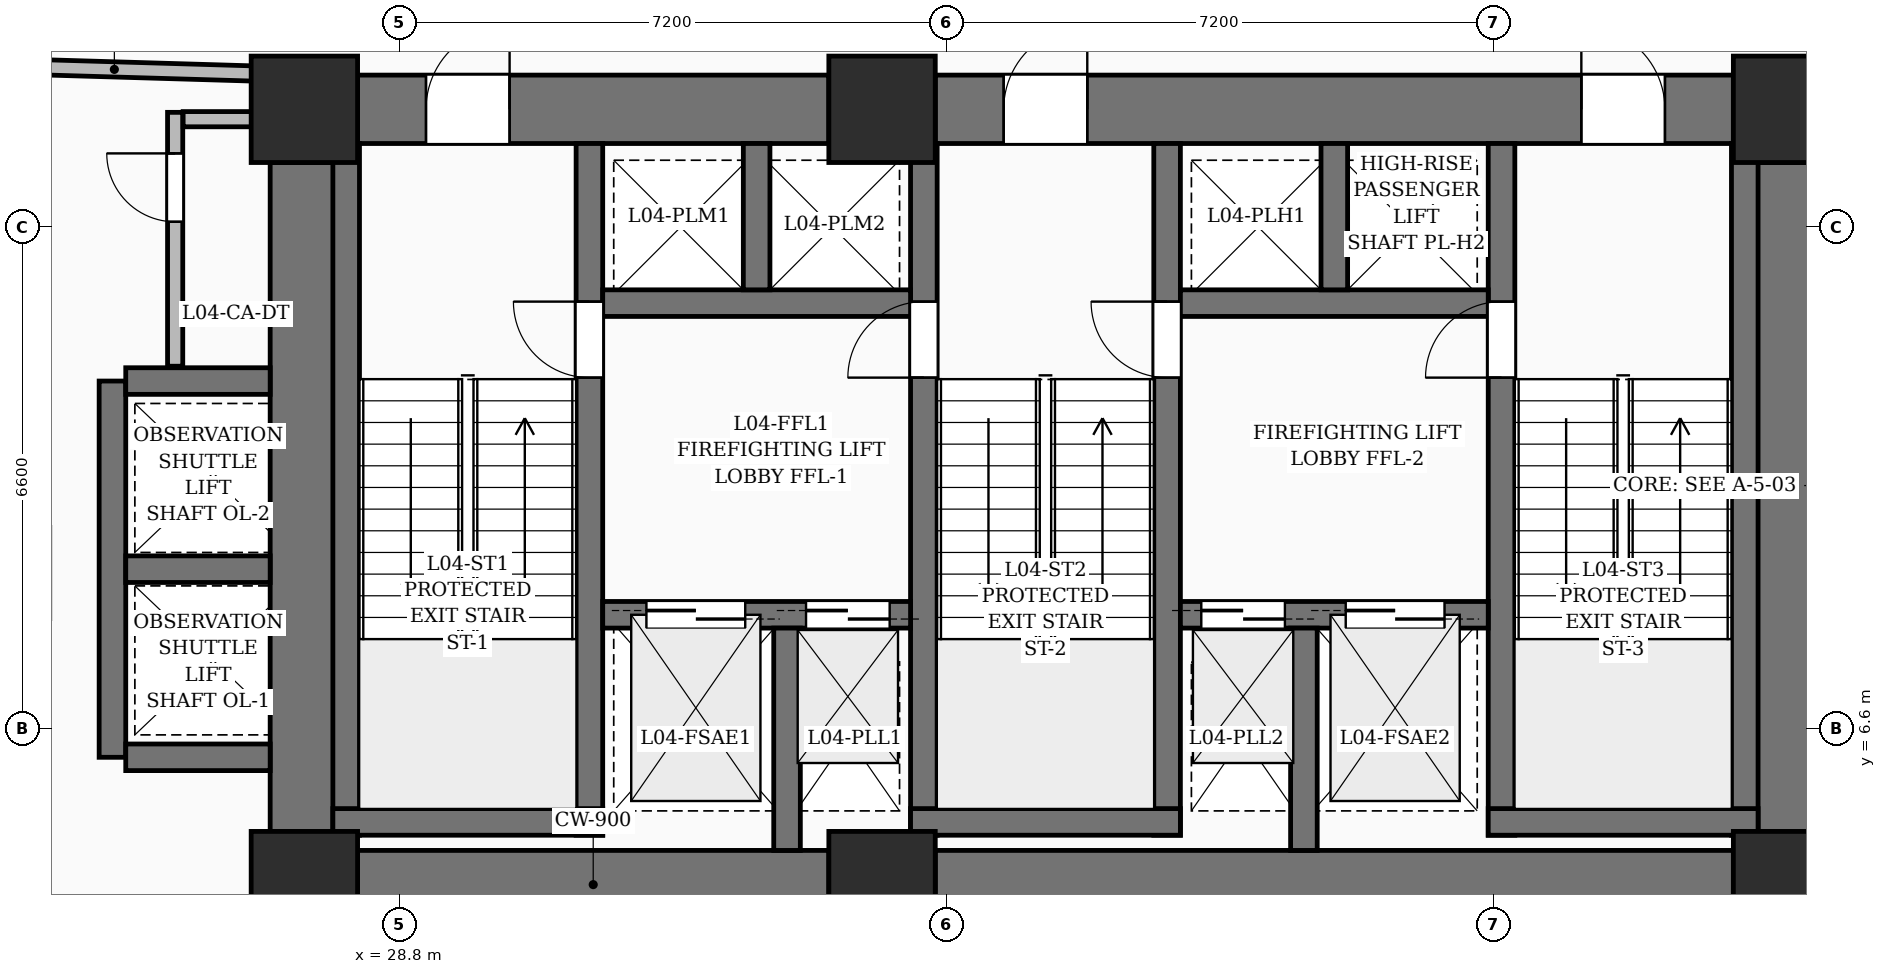
"""IFC4 building model, lengths in metres.
Left out: names, types, materials, properties, quantities, classifications, styles, units other than length and angle.
Written with IfcOpenShell. Run it as: python <this file> out.ifc"""

import sys

from ifc_helpers import new_model, si_unit, direction, frame, frame_2d, origin, origin_2d, place, context, subcontext, project, spatial, rectangle, extrude, element, fill, save


model = new_model("IFC4")
c1 = context("Model", 3, precision=1e-05, world=origin(), true_north=direction((0.0, 1.0)))
c2 = subcontext(c1, "Body", "Model", "MODEL_VIEW")
j1 = project(units=[si_unit("LENGTHUNIT", "METRE"), si_unit("PLANEANGLEUNIT", "RADIAN")], contexts=[c1])
p1 = place(None, origin())
s1 = spatial("IfcSite", under=j1, at=p1, CompositionType="ELEMENT")
p2 = place(p1, origin())
s2 = spatial("IfcBuilding", under=s1, at=p2, CompositionType="ELEMENT")
p3 = place(p2, frame((0.0, 0.0, 21.9)))
s3 = spatial("IfcBuildingStorey", under=s2, at=p3, CompositionType="ELEMENT", Elevation=21.9)
for number, where, z_axis, x_axis in (
    (1, (27.55, 4.55, 0.0), (0.0, 0.0, 1.0), (1.0, 0.0, 0.0)),
    (2, (35.15, 4.55, 0.0), (0.0, 0.0, 1.0), (1.0, 0.0, 0.0)),
    (3, (47.05, 4.55, 0.0), (0.0, 0.0, 1.0), (1.0, 0.0, 0.0)),
    (4, (27.55, 14.75, 0.0), (0.0, 0.0, 1.0), (1.0, 0.0, 0.0)),
    (5, (35.15, 14.75, 0.0), (0.0, 0.0, 1.0), (1.0, 0.0, 0.0)),
    (6, (47.05, 14.75, 0.0), (0.0, 0.0, 1.0), (1.0, 0.0, 0.0)),
):
    element("IfcColumn", number, at=place(p3, frame(where, z_axis=z_axis, x_axis=x_axis)), inside=s3, PredefinedType="COLUMN", context=c2, shape_type="SweptSolid", body=[
        extrude(rectangle(XDim=1.4, YDim=1.4, at=origin_2d()), origin(), (0.0, 0.0, 1.0), 4.5),
    ])
p4 = place(p3, frame((28.25, 4.55, 0.0), z_axis=(0.0, 0.0, 1.0), x_axis=(1.0, 0.0, 0.0)))
e7 = element("IfcWall", 7, at=p4, inside=s3, PredefinedType="SHEAR", context=c2, shape_type="SweptSolid", body=[
    extrude(rectangle(XDim=6.2, YDim=0.9, at=frame_2d((3.1, 0.0))), origin(), (0.0, 0.0, 1.0), 4.5),
])
p5 = place(p3, frame((35.85, 4.55, 0.0), z_axis=(0.0, 0.0, 1.0), x_axis=(1.0, 0.0, 0.0)))
e8 = element("IfcWall", 8, at=p5, inside=s3, PredefinedType="SHEAR", context=c2, shape_type="SweptSolid", body=[
    extrude(rectangle(XDim=10.5, YDim=0.9, at=frame_2d((5.25, 0.0))), origin(), (0.0, 0.0, 1.0), 4.5),
])
p6 = place(p3, frame((28.25, 14.75, 0.0), z_axis=(0.0, 0.0, 1.0), x_axis=(1.0, 0.0, 0.0)))
e9 = element("IfcWall", 9, at=p6, inside=s3, PredefinedType="SHEAR", context=c2, shape_type="SweptSolid", body=[
    extrude(rectangle(XDim=6.2, YDim=0.9, at=frame_2d((3.1, 0.0))), origin(), (0.0, 0.0, 1.0), 4.5),
])
p7 = place(p6, frame((0.9, 0.0, 0.0)))
e10 = element("IfcOpeningElement", 10, at=p7, cuts=e9, PredefinedType="OPENING", context=c2, shape_type="SweptSolid", body=[
    extrude(rectangle(XDim=1.1, YDim=2.2, at=frame_2d((0.55, 1.1))), frame((0.0, 0.46, 0.0), z_axis=(0.0, -1.0, 0.0), x_axis=(1.0, 0.0, 0.0)), (0.0, 0.0, 1.0), 0.92),
])
p8 = place(p3, frame((35.85, 14.75, 0.0), z_axis=(0.0, 0.0, 1.0), x_axis=(1.0, 0.0, 0.0)))
e11 = element("IfcWall", 11, at=p8, inside=s3, PredefinedType="SHEAR", context=c2, shape_type="SweptSolid", body=[
    extrude(rectangle(XDim=10.5, YDim=0.9, at=frame_2d((5.25, 0.0))), origin(), (0.0, 0.0, 1.0), 4.5),
])
p9 = place(p8, frame((0.9, 0.0, 0.0)))
e12 = element("IfcOpeningElement", 12, at=p9, cuts=e11, PredefinedType="OPENING", context=c2, shape_type="SweptSolid", body=[
    extrude(rectangle(XDim=1.1, YDim=2.2, at=frame_2d((0.55, 1.1))), frame((0.0, 0.46, 0.0), z_axis=(0.0, -1.0, 0.0), x_axis=(1.0, 0.0, 0.0)), (0.0, 0.0, 1.0), 0.92),
])
p10 = place(p8, frame((8.5, 0.0, 0.0)))
e13 = element("IfcOpeningElement", 13, at=p10, cuts=e11, PredefinedType="OPENING", context=c2, shape_type="SweptSolid", body=[
    extrude(rectangle(XDim=1.1, YDim=2.2, at=frame_2d((0.55, 1.1))), frame((0.0, 0.46, 0.0), z_axis=(0.0, -1.0, 0.0), x_axis=(1.0, 0.0, 0.0)), (0.0, 0.0, 1.0), 0.92),
])
for number, where, z_axis, x_axis in (
    (14, (27.55, 5.25, 0.0), (0.0, 0.0, 1.0), (0.0, 1.0, 0.0)),
    (15, (47.05, 5.25, 0.0), (0.0, 0.0, 1.0), (0.0, 1.0, 0.0)),
):
    element("IfcWall", number, at=place(p3, frame(where, z_axis=z_axis, x_axis=x_axis)), inside=s3, PredefinedType="SHEAR", context=c2, shape_type="SweptSolid", body=[
        extrude(rectangle(XDim=8.8, YDim=0.9, at=frame_2d((4.4, 0.0))), origin(), (0.0, 0.0, 1.0), 4.5),
    ])
p11 = place(p3, frame((28.1, 5.2, 0.0), z_axis=(0.0, 0.0, 1.0), x_axis=(0.0, 1.0, 0.0)))
e16 = element("IfcWall", 16, at=p11, inside=s3, PredefinedType="SOLIDWALL", context=c2, shape_type="SweptSolid", body=[
    extrude(rectangle(XDim=9.1, YDim=0.35, at=frame_2d((4.55, 0.0))), origin(), (0.0, 0.0, 1.0), 4.5),
])
p12 = place(p3, frame((31.3, 5.2, 0.0), z_axis=(0.0, 0.0, 1.0), x_axis=(0.0, 1.0, 0.0)))
e17 = element("IfcWall", 17, at=p12, inside=s3, PredefinedType="SOLIDWALL", context=c2, shape_type="SweptSolid", body=[
    extrude(rectangle(XDim=9.1, YDim=0.35, at=frame_2d((4.55, 0.0))), origin(), (0.0, 0.0, 1.0), 4.5),
])
p13 = place(p12, frame((6.02, 0.0, 0.0)))
e18 = element("IfcOpeningElement", 18, at=p13, cuts=e17, PredefinedType="OPENING", context=c2, shape_type="SweptSolid", body=[
    extrude(rectangle(XDim=1.0, YDim=2.15, at=frame_2d((0.5, 1.075))), frame((0.0, 0.185, 0.0), z_axis=(0.0, -1.0, 0.0), x_axis=(1.0, 0.0, 0.0)), (0.0, 0.0, 1.0), 0.37),
])
p14 = place(p3, frame((27.925, 5.375, 0.0), z_axis=(0.0, 0.0, 1.0), x_axis=(1.0, 0.0, 0.0)))
e19 = element("IfcWall", 19, at=p14, inside=s3, PredefinedType="SOLIDWALL", context=c2, shape_type="SweptSolid", body=[
    extrude(rectangle(XDim=3.55, YDim=0.35, at=frame_2d((1.775, 0.0))), origin(), (0.0, 0.0, 1.0), 4.5),
])
p15 = place(p3, frame((35.7, 5.2, 0.0), z_axis=(0.0, 0.0, 1.0), x_axis=(0.0, 1.0, 0.0)))
e20 = element("IfcWall", 20, at=p15, inside=s3, PredefinedType="SOLIDWALL", context=c2, shape_type="SweptSolid", body=[
    extrude(rectangle(XDim=9.1, YDim=0.35, at=frame_2d((4.55, 0.0))), origin(), (0.0, 0.0, 1.0), 4.5),
])
p16 = place(p15, frame((6.02, 0.0, 0.0)))
e21 = element("IfcOpeningElement", 21, at=p16, cuts=e20, PredefinedType="OPENING", context=c2, shape_type="SweptSolid", body=[
    extrude(rectangle(XDim=1.0, YDim=2.15, at=frame_2d((0.5, 1.075))), frame((0.0, 0.185, 0.0), z_axis=(0.0, -1.0, 0.0), x_axis=(1.0, 0.0, 0.0)), (0.0, 0.0, 1.0), 0.37),
])
p17 = place(p3, frame((38.9, 5.2, 0.0), z_axis=(0.0, 0.0, 1.0), x_axis=(0.0, 1.0, 0.0)))
e22 = element("IfcWall", 22, at=p17, inside=s3, PredefinedType="SOLIDWALL", context=c2, shape_type="SweptSolid", body=[
    extrude(rectangle(XDim=9.1, YDim=0.35, at=frame_2d((4.55, 0.0))), origin(), (0.0, 0.0, 1.0), 4.5),
])
p18 = place(p17, frame((6.02, 0.0, 0.0)))
e23 = element("IfcOpeningElement", 23, at=p18, cuts=e22, PredefinedType="OPENING", context=c2, shape_type="SweptSolid", body=[
    extrude(rectangle(XDim=1.0, YDim=2.15, at=frame_2d((0.5, 1.075))), frame((0.0, 0.185, 0.0), z_axis=(0.0, -1.0, 0.0), x_axis=(1.0, 0.0, 0.0)), (0.0, 0.0, 1.0), 0.37),
])
p19 = place(p3, frame((35.525, 5.375, 0.0), z_axis=(0.0, 0.0, 1.0), x_axis=(1.0, 0.0, 0.0)))
e24 = element("IfcWall", 24, at=p19, inside=s3, PredefinedType="SOLIDWALL", context=c2, shape_type="SweptSolid", body=[
    extrude(rectangle(XDim=3.55, YDim=0.35, at=frame_2d((1.775, 0.0))), origin(), (0.0, 0.0, 1.0), 4.5),
])
p20 = place(p3, frame((43.3, 5.2, 0.0), z_axis=(0.0, 0.0, 1.0), x_axis=(0.0, 1.0, 0.0)))
e25 = element("IfcWall", 25, at=p20, inside=s3, PredefinedType="SOLIDWALL", context=c2, shape_type="SweptSolid", body=[
    extrude(rectangle(XDim=9.1, YDim=0.35, at=frame_2d((4.55, 0.0))), origin(), (0.0, 0.0, 1.0), 4.5),
])
p21 = place(p20, frame((6.02, 0.0, 0.0)))
e26 = element("IfcOpeningElement", 26, at=p21, cuts=e25, PredefinedType="OPENING", context=c2, shape_type="SweptSolid", body=[
    extrude(rectangle(XDim=1.0, YDim=2.15, at=frame_2d((0.5, 1.075))), frame((0.0, 0.185, 0.0), z_axis=(0.0, -1.0, 0.0), x_axis=(1.0, 0.0, 0.0)), (0.0, 0.0, 1.0), 0.37),
])
p22 = place(p3, frame((46.5, 5.2, 0.0), z_axis=(0.0, 0.0, 1.0), x_axis=(0.0, 1.0, 0.0)))
e27 = element("IfcWall", 27, at=p22, inside=s3, PredefinedType="SOLIDWALL", context=c2, shape_type="SweptSolid", body=[
    extrude(rectangle(XDim=9.1, YDim=0.35, at=frame_2d((4.55, 0.0))), origin(), (0.0, 0.0, 1.0), 4.5),
])
p23 = place(p3, frame((43.125, 5.375, 0.0), z_axis=(0.0, 0.0, 1.0), x_axis=(1.0, 0.0, 0.0)))
e28 = element("IfcWall", 28, at=p23, inside=s3, PredefinedType="SOLIDWALL", context=c2, shape_type="SweptSolid", body=[
    extrude(rectangle(XDim=3.55, YDim=0.35, at=frame_2d((1.775, 0.0))), origin(), (0.0, 0.0, 1.0), 4.5),
])
p24 = place(p3, frame((31.475, 8.1, 0.0), z_axis=(0.0, 0.0, 1.0), x_axis=(1.0, 0.0, 0.0)))
e29 = element("IfcWall", 29, at=p24, inside=s3, PredefinedType="SOLIDWALL", context=c2, shape_type="SweptSolid", body=[
    extrude(rectangle(XDim=4.05, YDim=0.35, at=frame_2d((2.025, 0.0))), origin(), (0.0, 0.0, 1.0), 4.5),
])
p25 = place(p24, frame((0.575, 0.0, 0.0)))
e30 = element("IfcOpeningElement", 30, at=p25, cuts=e29, PredefinedType="OPENING", context=c2, shape_type="SweptSolid", body=[
    extrude(rectangle(XDim=1.3, YDim=2.25, at=frame_2d((0.65, 1.125))), frame((0.0, 0.185, 0.0), z_axis=(0.0, -1.0, 0.0), x_axis=(1.0, 0.0, 0.0)), (0.0, 0.0, 1.0), 0.37),
])
p26 = place(p24, frame((2.675, 0.0, 0.0)))
e31 = element("IfcOpeningElement", 31, at=p26, cuts=e29, PredefinedType="OPENING", context=c2, shape_type="SweptSolid", body=[
    extrude(rectangle(XDim=1.1, YDim=2.2, at=frame_2d((0.55, 1.1))), frame((0.0, 0.185, 0.0), z_axis=(0.0, -1.0, 0.0), x_axis=(1.0, 0.0, 0.0)), (0.0, 0.0, 1.0), 0.37),
])
p27 = place(p3, frame((39.075, 8.1, 0.0), z_axis=(0.0, 0.0, 1.0), x_axis=(1.0, 0.0, 0.0)))
e32 = element("IfcWall", 32, at=p27, inside=s3, PredefinedType="SOLIDWALL", context=c2, shape_type="SweptSolid", body=[
    extrude(rectangle(XDim=4.05, YDim=0.35, at=frame_2d((2.025, 0.0))), origin(), (0.0, 0.0, 1.0), 4.5),
])
p28 = place(p27, frame((2.175, 0.0, 0.0)))
e33 = element("IfcOpeningElement", 33, at=p28, cuts=e32, PredefinedType="OPENING", context=c2, shape_type="SweptSolid", body=[
    extrude(rectangle(XDim=1.3, YDim=2.25, at=frame_2d((0.65, 1.125))), frame((0.0, 0.185, 0.0), z_axis=(0.0, -1.0, 0.0), x_axis=(1.0, 0.0, 0.0)), (0.0, 0.0, 1.0), 0.37),
])
p29 = place(p27, frame((0.275, 0.0, 0.0)))
e34 = element("IfcOpeningElement", 34, at=p29, cuts=e32, PredefinedType="OPENING", context=c2, shape_type="SweptSolid", body=[
    extrude(rectangle(XDim=1.1, YDim=2.2, at=frame_2d((0.55, 1.1))), frame((0.0, 0.185, 0.0), z_axis=(0.0, -1.0, 0.0), x_axis=(1.0, 0.0, 0.0)), (0.0, 0.0, 1.0), 0.37),
])
for number, where, z_axis, x_axis in (
    (35, (33.9, 5.0, 0.0), (0.0, 0.0, 1.0), (0.0, 1.0, 0.0)),
    (36, (40.7, 5.0, 0.0), (0.0, 0.0, 1.0), (0.0, 1.0, 0.0)),
):
    element("IfcWall", number, at=place(p3, frame(where, z_axis=z_axis, x_axis=x_axis)), inside=s3, PredefinedType="SOLIDWALL", context=c2, shape_type="SweptSolid", body=[
        extrude(rectangle(XDim=2.925, YDim=0.35, at=frame_2d((1.462, 0.0))), origin(), (0.0, 0.0, 1.0), 4.5),
    ])
p30 = place(p3, frame((31.475, 12.2, 0.0), z_axis=(0.0, 0.0, 1.0), x_axis=(1.0, 0.0, 0.0)))
e37 = element("IfcWall", 37, at=p30, inside=s3, PredefinedType="SOLIDWALL", context=c2, shape_type="SweptSolid", body=[
    extrude(rectangle(XDim=4.05, YDim=0.35, at=frame_2d((2.025, 0.0))), origin(), (0.0, 0.0, 1.0), 4.5),
])
p31 = place(p3, frame((33.5, 12.375, 0.0), z_axis=(0.0, 0.0, 1.0), x_axis=(0.0, 1.0, 0.0)))
e38 = element("IfcWall", 38, at=p31, inside=s3, PredefinedType="SOLIDWALL", context=c2, shape_type="SweptSolid", body=[
    extrude(rectangle(XDim=1.925, YDim=0.35, at=frame_2d((0.962, 0.0))), origin(), (0.0, 0.0, 1.0), 4.5),
])
p32 = place(p3, frame((39.075, 12.2, 0.0), z_axis=(0.0, 0.0, 1.0), x_axis=(1.0, 0.0, 0.0)))
e39 = element("IfcWall", 39, at=p32, inside=s3, PredefinedType="SOLIDWALL", context=c2, shape_type="SweptSolid", body=[
    extrude(rectangle(XDim=4.05, YDim=0.35, at=frame_2d((2.025, 0.0))), origin(), (0.0, 0.0, 1.0), 4.5),
])
p33 = place(p3, frame((41.1, 12.375, 0.0), z_axis=(0.0, 0.0, 1.0), x_axis=(0.0, 1.0, 0.0)))
e40 = element("IfcWall", 40, at=p33, inside=s3, PredefinedType="SOLIDWALL", context=c2, shape_type="SweptSolid", body=[
    extrude(rectangle(XDim=1.925, YDim=0.35, at=frame_2d((0.962, 0.0))), origin(), (0.0, 0.0, 1.0), 4.5),
])
p34 = place(p3, frame((25.025, 6.225, 0.0), z_axis=(0.0, 0.0, 1.0), x_axis=(0.0, 1.0, 0.0)))
e41 = element("IfcWall", 41, at=p34, inside=s3, PredefinedType="SOLIDWALL", context=c2, shape_type="SweptSolid", body=[
    extrude(rectangle(XDim=4.95, YDim=0.35, at=frame_2d((2.475, 0.0))), origin(), (0.0, 0.0, 1.0), 4.5),
])
for number, where, z_axis, x_axis in (
    (42, (25.2, 6.225, 0.0), (0.0, 0.0, 1.0), (1.0, 0.0, 0.0)),
    (43, (25.2, 8.7, 0.0), (0.0, 0.0, 1.0), (1.0, 0.0, 0.0)),
    (44, (25.2, 11.175, 0.0), (0.0, 0.0, 1.0), (1.0, 0.0, 0.0)),
):
    element("IfcWall", number, at=place(p3, frame(where, z_axis=z_axis, x_axis=x_axis)), inside=s3, PredefinedType="SOLIDWALL", context=c2, shape_type="SweptSolid", body=[
        extrude(rectangle(XDim=1.9, YDim=0.35, at=frame_2d((0.95, 0.0))), origin(), (0.0, 0.0, 1.0), 4.5),
    ])
p35 = place(p3, frame((25.85, 11.37, 0.0), z_axis=(0.0, 0.0, 1.0), x_axis=(0.0, 1.0, 0.0)))
e45 = element("IfcWall", 45, at=p35, inside=s3, PredefinedType="PARTITIONING", context=c2, shape_type="SweptSolid", body=[
    extrude(rectangle(XDim=3.34, YDim=0.2, at=frame_2d((1.67, 0.0))), origin(), (0.0, 0.0, 1.0), 4.2),
])
p36 = place(p35, frame((1.9, 0.0, 0.0)))
e46 = element("IfcOpeningElement", 46, at=p36, cuts=e45, PredefinedType="OPENING", context=c2, shape_type="SweptSolid", body=[
    extrude(rectangle(XDim=0.9, YDim=2.1, at=frame_2d((0.45, 1.05))), frame((0.0, 0.11, 0.0), z_axis=(0.0, -1.0, 0.0), x_axis=(1.0, 0.0, 0.0)), (0.0, 0.0, 1.0), 0.22),
])
p37 = place(p3, frame((25.955, 14.62, 0.0), z_axis=(0.0, 0.0, 1.0), x_axis=(1.0, 0.0, 0.0)))
e47 = element("IfcWall", 47, at=p37, inside=s3, PredefinedType="PARTITIONING", context=c2, shape_type="SweptSolid", body=[
    extrude(rectangle(XDim=1.13, YDim=0.2, at=frame_2d((0.565, 0.0))), origin(), (0.0, 0.0, 1.0), 4.2),
])
p38 = place(p3, frame((22.5, 15.35, 0.0), z_axis=(0.0, 0.0, 1.0), x_axis=(0.999566926946, -0.029427173771, 0.0)))
e48 = element("IfcWall", 48, at=p38, inside=s3, PredefinedType="PARTITIONING", context=c2, shape_type="SweptSolid", body=[
    extrude(rectangle(XDim=5.102, YDim=0.2, at=frame_2d((2.551, 0.0))), origin(), (0.0, 0.0, 1.0), 1.97),
])
p39 = place(p7, origin())
e49 = element("IfcDoor", 49, at=p39, inside=s3, OperationType="SINGLE_SWING_RIGHT", PredefinedType="DOOR", context=c2, shape_type="SweptSolid", body=[
    extrude(rectangle(XDim=1.1, YDim=2.2, at=frame_2d((0.55, 1.1))), frame((0.0, 0.025, 0.0), z_axis=(0.0, -1.0, 0.0), x_axis=(1.0, 0.0, 0.0)), (0.0, 0.0, 1.0), 0.05),
])
fill(e10, e49)
p40 = place(p9, origin())
e50 = element("IfcDoor", 50, at=p40, inside=s3, OperationType="SINGLE_SWING_RIGHT", PredefinedType="DOOR", context=c2, shape_type="SweptSolid", body=[
    extrude(rectangle(XDim=1.1, YDim=2.2, at=frame_2d((0.55, 1.1))), frame((0.0, 0.025, 0.0), z_axis=(0.0, -1.0, 0.0), x_axis=(1.0, 0.0, 0.0)), (0.0, 0.0, 1.0), 0.05),
])
fill(e12, e50)
p41 = place(p10, origin())
e51 = element("IfcDoor", 51, at=p41, inside=s3, OperationType="SINGLE_SWING_LEFT", PredefinedType="DOOR", context=c2, shape_type="SweptSolid", body=[
    extrude(rectangle(XDim=1.1, YDim=2.2, at=frame_2d((0.55, 1.1))), frame((0.0, 0.025, 0.0), z_axis=(0.0, -1.0, 0.0), x_axis=(1.0, 0.0, 0.0)), (0.0, 0.0, 1.0), 0.05),
])
fill(e13, e51)
p42 = place(p13, origin())
e52 = element("IfcDoor", 52, at=p42, inside=s3, OperationType="SINGLE_SWING_RIGHT", PredefinedType="DOOR", context=c2, shape_type="SweptSolid", body=[
    extrude(rectangle(XDim=1.0, YDim=2.15, at=frame_2d((0.5, 1.075))), frame((0.0, 0.025, 0.0), z_axis=(0.0, -1.0, 0.0), x_axis=(1.0, 0.0, 0.0)), (0.0, 0.0, 1.0), 0.05),
])
fill(e18, e52)
p43 = place(p16, origin())
e53 = element("IfcDoor", 53, at=p43, inside=s3, OperationType="SINGLE_SWING_LEFT", PredefinedType="DOOR", context=c2, shape_type="SweptSolid", body=[
    extrude(rectangle(XDim=1.0, YDim=2.15, at=frame_2d((0.5, 1.075))), frame((0.0, 0.025, 0.0), z_axis=(0.0, -1.0, 0.0), x_axis=(1.0, 0.0, 0.0)), (0.0, 0.0, 1.0), 0.05),
])
fill(e21, e53)
p44 = place(p18, origin())
e54 = element("IfcDoor", 54, at=p44, inside=s3, OperationType="SINGLE_SWING_RIGHT", PredefinedType="DOOR", context=c2, shape_type="SweptSolid", body=[
    extrude(rectangle(XDim=1.0, YDim=2.15, at=frame_2d((0.5, 1.075))), frame((0.0, 0.025, 0.0), z_axis=(0.0, -1.0, 0.0), x_axis=(1.0, 0.0, 0.0)), (0.0, 0.0, 1.0), 0.05),
])
fill(e23, e54)
p45 = place(p21, origin())
e55 = element("IfcDoor", 55, at=p45, inside=s3, OperationType="SINGLE_SWING_LEFT", PredefinedType="DOOR", context=c2, shape_type="SweptSolid", body=[
    extrude(rectangle(XDim=1.0, YDim=2.15, at=frame_2d((0.5, 1.075))), frame((0.0, 0.025, 0.0), z_axis=(0.0, -1.0, 0.0), x_axis=(1.0, 0.0, 0.0)), (0.0, 0.0, 1.0), 0.05),
])
fill(e26, e55)
p46 = place(p25, origin())
e56 = element("IfcDoor", 56, at=p46, inside=s3, OperationType="DOUBLE_DOOR_SLIDING", PredefinedType="DOOR", context=c2, shape_type="SweptSolid", body=[
    extrude(rectangle(XDim=1.3, YDim=2.25, at=frame_2d((0.65, 1.125))), frame((0.0, 0.025, 0.0), z_axis=(0.0, -1.0, 0.0), x_axis=(1.0, 0.0, 0.0)), (0.0, 0.0, 1.0), 0.05),
])
fill(e30, e56)
p47 = place(p28, origin())
e57 = element("IfcDoor", 57, at=p47, inside=s3, OperationType="DOUBLE_DOOR_SLIDING", PredefinedType="DOOR", context=c2, shape_type="SweptSolid", body=[
    extrude(rectangle(XDim=1.3, YDim=2.25, at=frame_2d((0.65, 1.125))), frame((0.0, 0.025, 0.0), z_axis=(0.0, -1.0, 0.0), x_axis=(1.0, 0.0, 0.0)), (0.0, 0.0, 1.0), 0.05),
])
fill(e33, e57)
p48 = place(p26, origin())
e58 = element("IfcDoor", 58, at=p48, inside=s3, OperationType="DOUBLE_DOOR_SLIDING", PredefinedType="DOOR", context=c2, shape_type="SweptSolid", body=[
    extrude(rectangle(XDim=1.1, YDim=2.2, at=frame_2d((0.55, 1.1))), frame((0.0, 0.025, 0.0), z_axis=(0.0, -1.0, 0.0), x_axis=(1.0, 0.0, 0.0)), (0.0, 0.0, 1.0), 0.05),
])
fill(e31, e58)
p49 = place(p29, origin())
e59 = element("IfcDoor", 59, at=p49, inside=s3, OperationType="DOUBLE_DOOR_SLIDING", PredefinedType="DOOR", context=c2, shape_type="SweptSolid", body=[
    extrude(rectangle(XDim=1.1, YDim=2.2, at=frame_2d((0.55, 1.1))), frame((0.0, 0.025, 0.0), z_axis=(0.0, -1.0, 0.0), x_axis=(1.0, 0.0, 0.0)), (0.0, 0.0, 1.0), 0.05),
])
fill(e34, e59)
p50 = place(p36, origin())
e60 = element("IfcDoor", 60, at=p50, inside=s3, OperationType="SINGLE_SWING_RIGHT", PredefinedType="DOOR", context=c2, shape_type="SweptSolid", body=[
    extrude(rectangle(XDim=0.9, YDim=2.1, at=frame_2d((0.45, 1.05))), frame((0.0, 0.025, 0.0), z_axis=(0.0, -1.0, 0.0), x_axis=(1.0, 0.0, 0.0)), (0.0, 0.0, 1.0), 0.05),
])
fill(e46, e60)
save(model, sys.argv[1])
